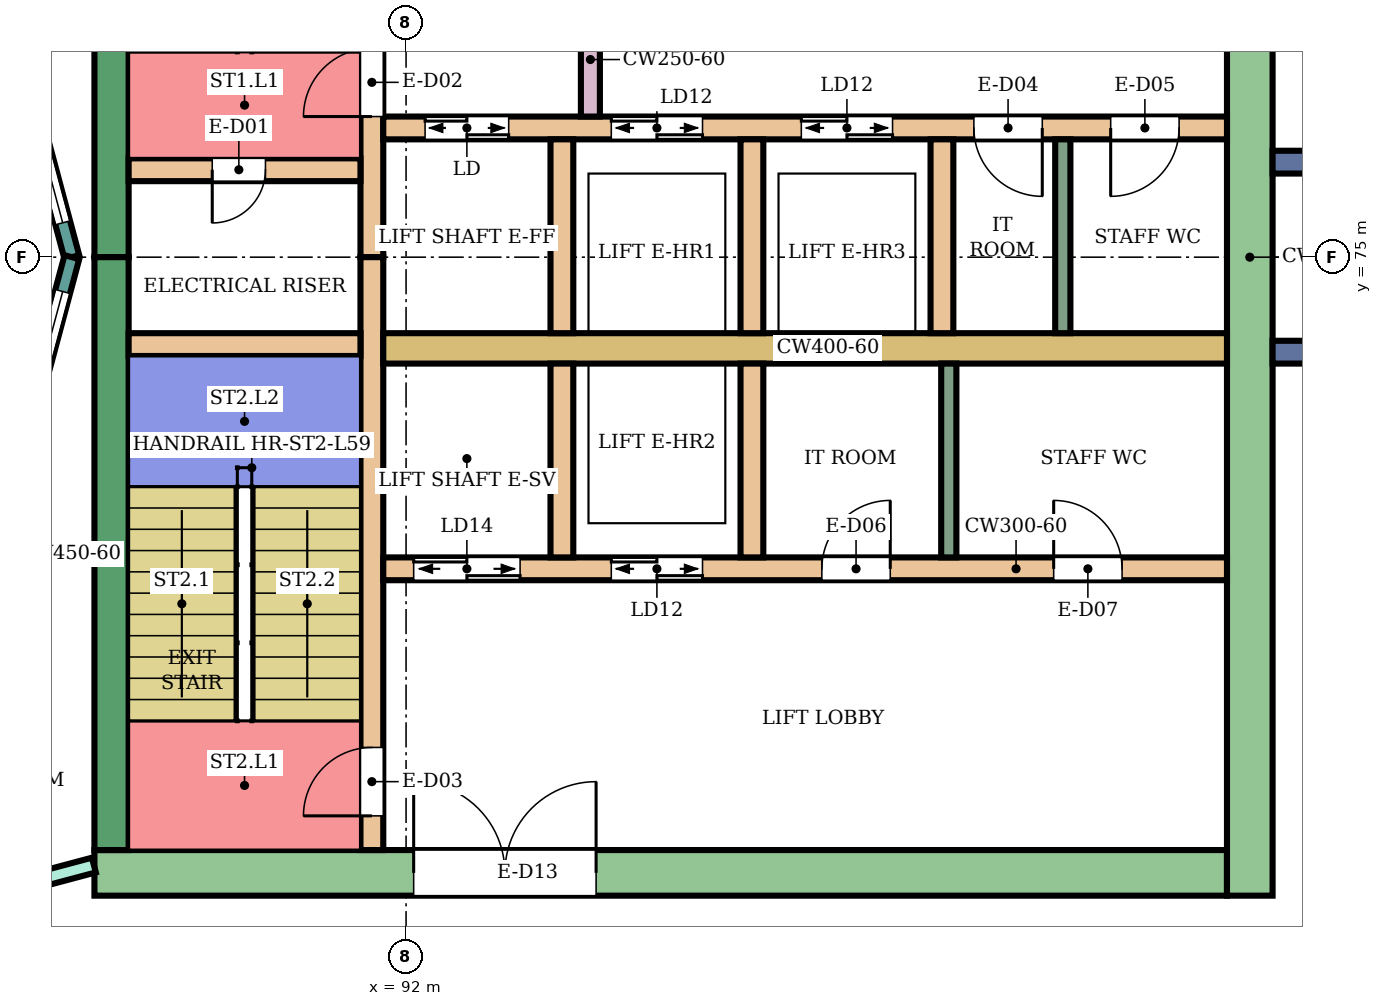
"""IFC4 building model, lengths in metres.
Left out: names, types, materials, properties, quantities, classifications, styles, units other than length and angle.
Written with IfcOpenShell. Run it as: python <this file> out.ifc"""

import sys

from ifc_helpers import new_model, si_unit, direction, frame, frame_2d, origin, place, context, subcontext, project, spatial, rectangle, extrude, element, fill, save


model = new_model("IFC4")
c1 = context("Model", 3, precision=1e-05, world=origin(), true_north=direction((0.0, 1.0)))
c2 = subcontext(c1, "Body", "Model", "MODEL_VIEW")
j1 = project(units=[si_unit("LENGTHUNIT", "METRE"), si_unit("PLANEANGLEUNIT", "RADIAN")], contexts=[c1])
p1 = place(None, origin())
s1 = spatial("IfcSite", under=j1, at=p1, CompositionType="ELEMENT")
p2 = place(p1, origin())
s2 = spatial("IfcBuilding", under=s1, at=p2, CompositionType="ELEMENT")
p3 = place(p2, frame((0.0, 0.0, 258.3)))
s3 = spatial("IfcBuildingStorey", under=s2, at=p3, CompositionType="ELEMENT", Elevation=258.3)
p4 = place(p3, frame((87.9, 66.9, 0.0), z_axis=(0.0, 0.0, 1.0), x_axis=(1.0, 0.0, 0.0)))
e1 = element("IfcWall", 1, at=p4, inside=s3, PredefinedType="SHEAR", context=c2, shape_type="SweptSolid", body=[
    extrude(rectangle(XDim=14.9, YDim=0.6, at=frame_2d((7.45, 0.0))), origin(), (0.0, 0.0, 1.0), 3.88),
])
p5 = place(p4, frame((4.2, 0.0, 0.0)))
e2 = element("IfcOpeningElement", 2, at=p5, cuts=e1, PredefinedType="OPENING", context=c2, shape_type="SweptSolid", body=[
    extrude(rectangle(XDim=2.4, YDim=2.4, at=frame_2d((1.2, 1.2))), frame((0.0, 0.31, 0.0), z_axis=(0.0, -1.0, 0.0), x_axis=(1.0, 0.0, 0.0)), (0.0, 0.0, 1.0), 0.62),
])
for number, where, z_axis, x_axis in (
    (3, (88.125, 75.0, 0.0), (0.0, 0.0, 1.0), (0.0, 1.0, 0.0)),
    (4, (88.125, 67.2, 0.0), (0.0, 0.0, 1.0), (0.0, 1.0, 0.0)),
):
    element("IfcWall", number, at=place(p3, frame(where, z_axis=z_axis, x_axis=x_axis)), inside=s3, PredefinedType="SHEAR", context=c2, shape_type="SweptSolid", body=[
        extrude(rectangle(XDim=7.8, YDim=0.45, at=frame_2d((3.9, 0.0))), origin(), (0.0, 0.0, 1.0), 3.88),
    ])
p6 = place(p3, frame((103.1, 66.6, 0.0), z_axis=(0.0, 0.0, 1.0), x_axis=(0.0, 1.0, 0.0)))
e5 = element("IfcWall", 5, at=p6, inside=s3, PredefinedType="SHEAR", context=c2, shape_type="SweptSolid", body=[
    extrude(rectangle(XDim=16.8, YDim=0.6, at=frame_2d((8.4, 0.0))), origin(), (0.0, 0.0, 1.0), 3.88),
])
p7 = place(p3, frame((91.55, 75.0, 0.0), z_axis=(0.0, 0.0, 1.0), x_axis=(0.0, 1.0, 0.0)))
e6 = element("IfcWall", 6, at=p7, inside=s3, PredefinedType="SHEAR", context=c2, shape_type="SweptSolid", body=[
    extrude(rectangle(XDim=7.8, YDim=0.3, at=frame_2d((3.9, 0.0))), origin(), (0.0, 0.0, 1.0), 3.88),
])
p8 = place(p7, frame((1.85, 0.0, 0.0)))
e7 = element("IfcOpeningElement", 7, at=p8, cuts=e6, PredefinedType="OPENING", context=c2, shape_type="SweptSolid", body=[
    extrude(rectangle(XDim=0.9, YDim=2.1, at=frame_2d((0.45, 1.05))), frame((0.0, 0.16, 0.0), z_axis=(0.0, -1.0, 0.0), x_axis=(1.0, 0.0, 0.0)), (0.0, 0.0, 1.0), 0.32),
])
p9 = place(p3, frame((91.55, 67.2, 0.0), z_axis=(0.0, 0.0, 1.0), x_axis=(0.0, 1.0, 0.0)))
e8 = element("IfcWall", 8, at=p9, inside=s3, PredefinedType="SHEAR", context=c2, shape_type="SweptSolid", body=[
    extrude(rectangle(XDim=7.8, YDim=0.3, at=frame_2d((3.9, 0.0))), origin(), (0.0, 0.0, 1.0), 3.88),
])
p10 = place(p9, frame((0.45, 0.0, 0.0)))
e9 = element("IfcOpeningElement", 9, at=p10, cuts=e8, PredefinedType="OPENING", context=c2, shape_type="SweptSolid", body=[
    extrude(rectangle(XDim=0.9, YDim=2.1, at=frame_2d((0.45, 1.05))), frame((0.0, 0.16, 0.0), z_axis=(0.0, -1.0, 0.0), x_axis=(1.0, 0.0, 0.0)), (0.0, 0.0, 1.0), 0.32),
])
p11 = place(p3, frame((88.35, 76.15, 0.0), z_axis=(0.0, 0.0, 1.0), x_axis=(1.0, 0.0, 0.0)))
e10 = element("IfcWall", 10, at=p11, inside=s3, PredefinedType="SHEAR", context=c2, shape_type="SweptSolid", body=[
    extrude(rectangle(XDim=3.05, YDim=0.3, at=frame_2d((1.525, 0.0))), origin(), (0.0, 0.0, 1.0), 3.88),
])
p12 = place(p11, frame((1.1, 0.0, 0.0)))
e11 = element("IfcOpeningElement", 11, at=p12, cuts=e10, PredefinedType="OPENING", context=c2, shape_type="SweptSolid", body=[
    extrude(rectangle(XDim=0.7, YDim=2.0, at=frame_2d((0.35, 1.0))), frame((0.0, 0.16, 0.0), z_axis=(0.0, -1.0, 0.0), x_axis=(1.0, 0.0, 0.0)), (0.0, 0.0, 1.0), 0.32),
])
p13 = place(p3, frame((88.35, 73.85, 0.0), z_axis=(0.0, 0.0, 1.0), x_axis=(1.0, 0.0, 0.0)))
e12 = element("IfcWall", 12, at=p13, inside=s3, PredefinedType="SHEAR", context=c2, shape_type="SweptSolid", body=[
    extrude(rectangle(XDim=3.05, YDim=0.3, at=frame_2d((1.525, 0.0))), origin(), (0.0, 0.0, 1.0), 3.88),
])
p14 = place(p3, frame((91.7, 76.7, 0.0), z_axis=(0.0, 0.0, 1.0), x_axis=(1.0, 0.0, 0.0)))
e13 = element("IfcWall", 13, at=p14, inside=s3, PredefinedType="SHEAR", context=c2, shape_type="SweptSolid", body=[
    extrude(rectangle(XDim=11.1, YDim=0.3, at=frame_2d((5.55, 0.0))), origin(), (0.0, 0.0, 1.0), 3.88),
])
p15 = place(p14, frame((0.55, 0.0, 0.0)))
e14 = element("IfcOpeningElement", 14, at=p15, cuts=e13, PredefinedType="OPENING", context=c2, shape_type="SweptSolid", body=[
    extrude(rectangle(XDim=1.1, YDim=2.1, at=frame_2d((0.55, 1.05))), frame((0.0, 0.16, 0.0), z_axis=(0.0, -1.0, 0.0), x_axis=(1.0, 0.0, 0.0)), (0.0, 0.0, 1.0), 0.32),
])
p16 = place(p14, frame((3.0, 0.0, 0.0)))
e15 = element("IfcOpeningElement", 15, at=p16, cuts=e13, PredefinedType="OPENING", context=c2, shape_type="SweptSolid", body=[
    extrude(rectangle(XDim=1.2, YDim=2.1, at=frame_2d((0.6, 1.05))), frame((0.0, 0.16, 0.0), z_axis=(0.0, -1.0, 0.0), x_axis=(1.0, 0.0, 0.0)), (0.0, 0.0, 1.0), 0.32),
])
p17 = place(p14, frame((5.5, 0.0, 0.0)))
e16 = element("IfcOpeningElement", 16, at=p17, cuts=e13, PredefinedType="OPENING", context=c2, shape_type="SweptSolid", body=[
    extrude(rectangle(XDim=1.2, YDim=2.1, at=frame_2d((0.6, 1.05))), frame((0.0, 0.16, 0.0), z_axis=(0.0, -1.0, 0.0), x_axis=(1.0, 0.0, 0.0)), (0.0, 0.0, 1.0), 0.32),
])
p18 = place(p14, frame((7.77, 0.0, 0.0)))
e17 = element("IfcOpeningElement", 17, at=p18, cuts=e13, PredefinedType="OPENING", context=c2, shape_type="SweptSolid", body=[
    extrude(rectangle(XDim=0.9, YDim=2.1, at=frame_2d((0.45, 1.05))), frame((0.0, 0.16, 0.0), z_axis=(0.0, -1.0, 0.0), x_axis=(1.0, 0.0, 0.0)), (0.0, 0.0, 1.0), 0.32),
])
p19 = place(p14, frame((9.57, 0.0, 0.0)))
e18 = element("IfcOpeningElement", 18, at=p19, cuts=e13, PredefinedType="OPENING", context=c2, shape_type="SweptSolid", body=[
    extrude(rectangle(XDim=0.9, YDim=2.1, at=frame_2d((0.45, 1.05))), frame((0.0, 0.16, 0.0), z_axis=(0.0, -1.0, 0.0), x_axis=(1.0, 0.0, 0.0)), (0.0, 0.0, 1.0), 0.32),
])
p20 = place(p3, frame((91.7, 73.8, 0.0), z_axis=(0.0, 0.0, 1.0), x_axis=(1.0, 0.0, 0.0)))
e19 = element("IfcWall", 19, at=p20, inside=s3, PredefinedType="SHEAR", context=c2, shape_type="SweptSolid", body=[
    extrude(rectangle(XDim=11.1, YDim=0.4, at=frame_2d((5.55, 0.0))), origin(), (0.0, 0.0, 1.0), 3.88),
])
p21 = place(p3, frame((91.7, 70.9, 0.0), z_axis=(0.0, 0.0, 1.0), x_axis=(1.0, 0.0, 0.0)))
e20 = element("IfcWall", 20, at=p21, inside=s3, PredefinedType="SHEAR", context=c2, shape_type="SweptSolid", body=[
    extrude(rectangle(XDim=11.1, YDim=0.3, at=frame_2d((5.55, 0.0))), origin(), (0.0, 0.0, 1.0), 3.88),
])
p22 = place(p21, frame((0.4, 0.0, 0.0)))
e21 = element("IfcOpeningElement", 21, at=p22, cuts=e20, PredefinedType="OPENING", context=c2, shape_type="SweptSolid", body=[
    extrude(rectangle(XDim=1.4, YDim=2.1, at=frame_2d((0.7, 1.05))), frame((0.0, 0.16, 0.0), z_axis=(0.0, -1.0, 0.0), x_axis=(1.0, 0.0, 0.0)), (0.0, 0.0, 1.0), 0.32),
])
p23 = place(p21, frame((3.0, 0.0, 0.0)))
e22 = element("IfcOpeningElement", 22, at=p23, cuts=e20, PredefinedType="OPENING", context=c2, shape_type="SweptSolid", body=[
    extrude(rectangle(XDim=1.2, YDim=2.1, at=frame_2d((0.6, 1.05))), frame((0.0, 0.16, 0.0), z_axis=(0.0, -1.0, 0.0), x_axis=(1.0, 0.0, 0.0)), (0.0, 0.0, 1.0), 0.32),
])
p24 = place(p21, frame((5.77, 0.0, 0.0)))
e23 = element("IfcOpeningElement", 23, at=p24, cuts=e20, PredefinedType="OPENING", context=c2, shape_type="SweptSolid", body=[
    extrude(rectangle(XDim=0.9, YDim=2.1, at=frame_2d((0.45, 1.05))), frame((0.0, 0.16, 0.0), z_axis=(0.0, -1.0, 0.0), x_axis=(1.0, 0.0, 0.0)), (0.0, 0.0, 1.0), 0.32),
])
p25 = place(p21, frame((8.82, 0.0, 0.0)))
e24 = element("IfcOpeningElement", 24, at=p25, cuts=e20, PredefinedType="OPENING", context=c2, shape_type="SweptSolid", body=[
    extrude(rectangle(XDim=0.9, YDim=2.1, at=frame_2d((0.45, 1.05))), frame((0.0, 0.16, 0.0), z_axis=(0.0, -1.0, 0.0), x_axis=(1.0, 0.0, 0.0)), (0.0, 0.0, 1.0), 0.32),
])
for number, where, z_axis, x_axis in (
    (25, (94.05, 74.0, 0.0), (0.0, 0.0, 1.0), (0.0, 1.0, 0.0)),
    (26, (96.55, 74.0, 0.0), (0.0, 0.0, 1.0), (0.0, 1.0, 0.0)),
    (27, (99.05, 74.0, 0.0), (0.0, 0.0, 1.0), (0.0, 1.0, 0.0)),
    (28, (94.05, 71.05, 0.0), (0.0, 0.0, 1.0), (0.0, 1.0, 0.0)),
    (29, (96.55, 71.05, 0.0), (0.0, 0.0, 1.0), (0.0, 1.0, 0.0)),
):
    element("IfcWall", number, at=place(p3, frame(where, z_axis=z_axis, x_axis=x_axis)), inside=s3, PredefinedType="SHEAR", context=c2, shape_type="SweptSolid", body=[
        extrude(rectangle(XDim=2.55, YDim=0.3, at=frame_2d((1.275, 0.0))), origin(), (0.0, 0.0, 1.0), 3.88),
    ])
p26 = place(p3, frame((94.425, 76.85, 0.0), z_axis=(0.0, 0.0, 1.0), x_axis=(0.0, 1.0, 0.0)))
e30 = element("IfcWall", 30, at=p26, inside=s3, PredefinedType="SHEAR", context=c2, shape_type="SweptSolid", body=[
    extrude(rectangle(XDim=1.5, YDim=0.25, at=frame_2d((0.75, 0.0))), origin(), (0.0, 0.0, 1.0), 3.88),
])
for number, where, z_axis, x_axis in (
    (31, (103.4, 73.75, 0.0), (0.0, 0.0, 1.0), (1.0, 0.0, 0.0)),
    (32, (103.4, 76.25, 0.0), (0.0, 0.0, 1.0), (1.0, 0.0, 0.0)),
):
    element("IfcWall", number, at=place(p3, frame(where, z_axis=z_axis, x_axis=x_axis)), inside=s3, PredefinedType="NOTDEFINED", context=c2, shape_type="SweptSolid", body=[
        extrude(rectangle(XDim=2.416, YDim=0.3, at=frame_2d((1.208, 0.0))), origin(), (0.0, 0.0, 1.0), 4.2),
    ])
p27 = place(p3, frame((87.604, 75.0, 0.0), z_axis=(0.0, 0.0, 1.0), x_axis=(-0.258789828301, 0.965933654434, 0.0)))
e33 = element("IfcWall", 33, at=p27, inside=s3, PredefinedType="NOTDEFINED", context=c2, shape_type="SweptSolid", body=[
    extrude(rectangle(XDim=3.936, YDim=0.2, at=frame_2d((1.968, 0.0))), origin(), (0.0, 0.0, 1.0), 4.2),
])
p28 = place(p27, frame((0.468, 0.0, 0.9)))
e34 = element("IfcOpeningElement", 34, at=p28, cuts=e33, PredefinedType="OPENING", context=c2, shape_type="SweptSolid", body=[
    extrude(rectangle(XDim=3.0, YDim=2.3, at=frame_2d((1.5, 1.15))), frame((0.0, 0.11, 0.0), z_axis=(0.0, -1.0, 0.0), x_axis=(1.0, 0.0, 0.0)), (0.0, 0.0, 1.0), 0.22),
])
p29 = place(p3, frame((86.585, 71.198, 0.0), z_axis=(0.0, 0.0, 1.0), x_axis=(0.258789828301, 0.965933654434, 0.0)))
e35 = element("IfcWall", 35, at=p29, inside=s3, PredefinedType="NOTDEFINED", context=c2, shape_type="SweptSolid", body=[
    extrude(rectangle(XDim=3.936, YDim=0.2, at=frame_2d((1.968, 0.0))), origin(), (0.0, 0.0, 1.0), 4.2),
])
p30 = place(p29, frame((0.468, 0.0, 0.9)))
e36 = element("IfcOpeningElement", 36, at=p30, cuts=e35, PredefinedType="OPENING", context=c2, shape_type="SweptSolid", body=[
    extrude(rectangle(XDim=3.0, YDim=2.3, at=frame_2d((1.5, 1.15))), frame((0.0, 0.11, 0.0), z_axis=(0.0, -1.0, 0.0), x_axis=(1.0, 0.0, 0.0)), (0.0, 0.0, 1.0), 0.22),
])
p31 = place(p3, frame((80.0, 64.898, 0.0), z_axis=(0.0, 0.0, 1.0), x_axis=(0.966237419782, 0.257653349704, 0.0)))
e37 = element("IfcWall", 37, at=p31, inside=s3, PredefinedType="PARTITIONING", context=c2, shape_type="SweptSolid", body=[
    extrude(rectangle(XDim=8.169, YDim=0.2, at=frame_2d((4.084, 0.0))), origin(), (0.0, 0.0, 1.0), 3.75),
])
p32 = place(p31, frame((6.428, 0.0, 0.0)))
e38 = element("IfcOpeningElement", 38, at=p32, cuts=e37, PredefinedType="OPENING", context=c2, shape_type="SweptSolid", body=[
    extrude(rectangle(XDim=0.9, YDim=2.1, at=frame_2d((0.45, 1.05))), frame((0.0, 0.11, 0.0), z_axis=(0.0, -1.0, 0.0), x_axis=(1.0, 0.0, 0.0)), (0.0, 0.0, 1.0), 0.22),
])
for number, where, z_axis, x_axis in (
    (39, (100.64, 74.0, 0.0), (0.0, 0.0, 1.0), (0.0, 1.0, 0.0)),
    (40, (99.14, 71.05, 0.0), (0.0, 0.0, 1.0), (0.0, 1.0, 0.0)),
):
    element("IfcWall", number, at=place(p3, frame(where, z_axis=z_axis, x_axis=x_axis)), inside=s3, PredefinedType="PARTITIONING", context=c2, shape_type="SweptSolid", body=[
        extrude(rectangle(XDim=2.55, YDim=0.2, at=frame_2d((1.275, 0.0))), origin(), (0.0, 0.0, 1.0), 3.88),
    ])
p33 = place(p28, origin())
e41 = element("IfcWindow", 41, at=p33, inside=s3, PartitioningType="SINGLE_PANEL", PredefinedType="WINDOW", context=c2, shape_type="SweptSolid", body=[
    extrude(rectangle(XDim=3.0, YDim=2.3, at=frame_2d((1.5, 1.15))), frame((0.0, 0.03, 0.0), z_axis=(0.0, -1.0, 0.0), x_axis=(1.0, 0.0, 0.0)), (0.0, 0.0, 1.0), 0.06),
])
fill(e34, e41)
p34 = place(p30, origin())
e42 = element("IfcWindow", 42, at=p34, inside=s3, PartitioningType="SINGLE_PANEL", PredefinedType="WINDOW", context=c2, shape_type="SweptSolid", body=[
    extrude(rectangle(XDim=3.0, YDim=2.3, at=frame_2d((1.5, 1.15))), frame((0.0, 0.03, 0.0), z_axis=(0.0, -1.0, 0.0), x_axis=(1.0, 0.0, 0.0)), (0.0, 0.0, 1.0), 0.06),
])
fill(e36, e42)
p35 = place(p12, frame((0.7, 0.0, 0.0), z_axis=(0.0, 0.0, 1.0), x_axis=(-1.0, 0.0, 0.0)))
e43 = element("IfcDoor", 43, at=p35, inside=s3, OperationType="SINGLE_SWING_RIGHT", PredefinedType="DOOR", context=c2, shape_type="SweptSolid", body=[
    extrude(rectangle(XDim=0.7, YDim=2.0, at=frame_2d((0.35, 1.0))), frame((0.0, 0.025, 0.0), z_axis=(0.0, -1.0, 0.0), x_axis=(1.0, 0.0, 0.0)), (0.0, 0.0, 1.0), 0.05),
])
fill(e11, e43)
p36 = place(p8, origin())
e44 = element("IfcDoor", 44, at=p36, inside=s3, OperationType="SINGLE_SWING_LEFT", PredefinedType="DOOR", context=c2, shape_type="SweptSolid", body=[
    extrude(rectangle(XDim=0.9, YDim=2.1, at=frame_2d((0.45, 1.05))), frame((0.0, 0.025, 0.0), z_axis=(0.0, -1.0, 0.0), x_axis=(1.0, 0.0, 0.0)), (0.0, 0.0, 1.0), 0.05),
])
fill(e7, e44)
p37 = place(p10, origin())
e45 = element("IfcDoor", 45, at=p37, inside=s3, OperationType="SINGLE_SWING_LEFT", PredefinedType="DOOR", context=c2, shape_type="SweptSolid", body=[
    extrude(rectangle(XDim=0.9, YDim=2.1, at=frame_2d((0.45, 1.05))), frame((0.0, 0.025, 0.0), z_axis=(0.0, -1.0, 0.0), x_axis=(1.0, 0.0, 0.0)), (0.0, 0.0, 1.0), 0.05),
])
fill(e9, e45)
p38 = place(p15, origin())
e46 = element("IfcDoor", 46, at=p38, inside=s3, OperationType="DOUBLE_DOOR_SLIDING", PredefinedType="DOOR", context=c2, shape_type="SweptSolid", body=[
    extrude(rectangle(XDim=1.1, YDim=2.1, at=frame_2d((0.55, 1.05))), frame((0.0, 0.025, 0.0), z_axis=(0.0, -1.0, 0.0), x_axis=(1.0, 0.0, 0.0)), (0.0, 0.0, 1.0), 0.05),
])
fill(e14, e46)
p39 = place(p16, origin())
e47 = element("IfcDoor", 47, at=p39, inside=s3, OperationType="DOUBLE_DOOR_SLIDING", PredefinedType="DOOR", context=c2, shape_type="SweptSolid", body=[
    extrude(rectangle(XDim=1.2, YDim=2.1, at=frame_2d((0.6, 1.05))), frame((0.0, 0.025, 0.0), z_axis=(0.0, -1.0, 0.0), x_axis=(1.0, 0.0, 0.0)), (0.0, 0.0, 1.0), 0.05),
])
fill(e15, e47)
p40 = place(p17, origin())
e48 = element("IfcDoor", 48, at=p40, inside=s3, OperationType="DOUBLE_DOOR_SLIDING", PredefinedType="DOOR", context=c2, shape_type="SweptSolid", body=[
    extrude(rectangle(XDim=1.2, YDim=2.1, at=frame_2d((0.6, 1.05))), frame((0.0, 0.025, 0.0), z_axis=(0.0, -1.0, 0.0), x_axis=(1.0, 0.0, 0.0)), (0.0, 0.0, 1.0), 0.05),
])
fill(e16, e48)
p41 = place(p18, frame((0.9, 0.0, 0.0), z_axis=(0.0, 0.0, 1.0), x_axis=(-1.0, 0.0, 0.0)))
e49 = element("IfcDoor", 49, at=p41, inside=s3, OperationType="SINGLE_SWING_LEFT", PredefinedType="DOOR", context=c2, shape_type="SweptSolid", body=[
    extrude(rectangle(XDim=0.9, YDim=2.1, at=frame_2d((0.45, 1.05))), frame((0.0, 0.025, 0.0), z_axis=(0.0, -1.0, 0.0), x_axis=(1.0, 0.0, 0.0)), (0.0, 0.0, 1.0), 0.05),
])
fill(e17, e49)
p42 = place(p19, frame((0.9, 0.0, 0.0), z_axis=(0.0, 0.0, 1.0), x_axis=(-1.0, 0.0, 0.0)))
e50 = element("IfcDoor", 50, at=p42, inside=s3, OperationType="SINGLE_SWING_RIGHT", PredefinedType="DOOR", context=c2, shape_type="SweptSolid", body=[
    extrude(rectangle(XDim=0.9, YDim=2.1, at=frame_2d((0.45, 1.05))), frame((0.0, 0.025, 0.0), z_axis=(0.0, -1.0, 0.0), x_axis=(1.0, 0.0, 0.0)), (0.0, 0.0, 1.0), 0.05),
])
fill(e18, e50)
p43 = place(p22, origin())
e51 = element("IfcDoor", 51, at=p43, inside=s3, OperationType="DOUBLE_DOOR_SLIDING", PredefinedType="DOOR", context=c2, shape_type="SweptSolid", body=[
    extrude(rectangle(XDim=1.4, YDim=2.1, at=frame_2d((0.7, 1.05))), frame((0.0, 0.025, 0.0), z_axis=(0.0, -1.0, 0.0), x_axis=(1.0, 0.0, 0.0)), (0.0, 0.0, 1.0), 0.05),
])
fill(e21, e51)
p44 = place(p23, origin())
e52 = element("IfcDoor", 52, at=p44, inside=s3, OperationType="DOUBLE_DOOR_SLIDING", PredefinedType="DOOR", context=c2, shape_type="SweptSolid", body=[
    extrude(rectangle(XDim=1.2, YDim=2.1, at=frame_2d((0.6, 1.05))), frame((0.0, 0.025, 0.0), z_axis=(0.0, -1.0, 0.0), x_axis=(1.0, 0.0, 0.0)), (0.0, 0.0, 1.0), 0.05),
])
fill(e22, e52)
p45 = place(p24, origin())
e53 = element("IfcDoor", 53, at=p45, inside=s3, OperationType="SINGLE_SWING_RIGHT", PredefinedType="DOOR", context=c2, shape_type="SweptSolid", body=[
    extrude(rectangle(XDim=0.9, YDim=2.1, at=frame_2d((0.45, 1.05))), frame((0.0, 0.025, 0.0), z_axis=(0.0, -1.0, 0.0), x_axis=(1.0, 0.0, 0.0)), (0.0, 0.0, 1.0), 0.05),
])
fill(e23, e53)
p46 = place(p25, origin())
e54 = element("IfcDoor", 54, at=p46, inside=s3, OperationType="SINGLE_SWING_LEFT", PredefinedType="DOOR", context=c2, shape_type="SweptSolid", body=[
    extrude(rectangle(XDim=0.9, YDim=2.1, at=frame_2d((0.45, 1.05))), frame((0.0, 0.025, 0.0), z_axis=(0.0, -1.0, 0.0), x_axis=(1.0, 0.0, 0.0)), (0.0, 0.0, 1.0), 0.05),
])
fill(e24, e54)
p47 = place(p5, origin())
e55 = element("IfcDoor", 55, at=p47, inside=s3, OperationType="DOUBLE_DOOR_SINGLE_SWING", PredefinedType="DOOR", context=c2, shape_type="SweptSolid", body=[
    extrude(rectangle(XDim=2.4, YDim=2.4, at=frame_2d((1.2, 1.2))), frame((0.0, 0.025, 0.0), z_axis=(0.0, -1.0, 0.0), x_axis=(1.0, 0.0, 0.0)), (0.0, 0.0, 1.0), 0.05),
])
fill(e2, e55)
save(model, sys.argv[1])
